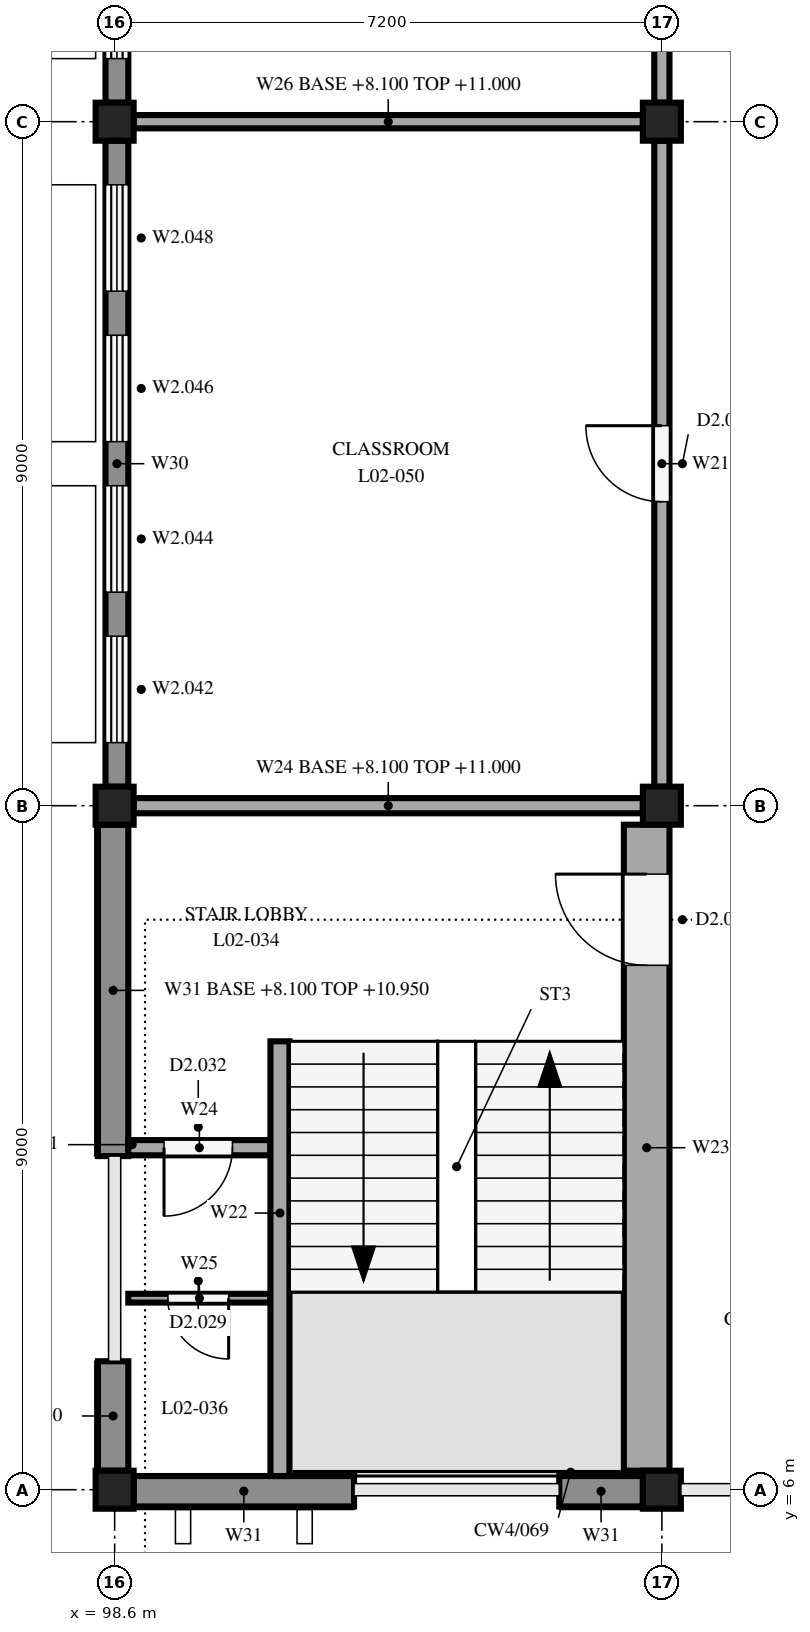
"""IFC4 building model, lengths in metres.
Left out: names, types, materials, properties, quantities, classifications, styles, units other than length and angle.
Written with IfcOpenShell. Run it as: python <this file> out.ifc"""

import sys

from ifc_helpers import new_model, si_unit, direction, frame, frame_2d, origin, origin_2d, place, context, subcontext, project, spatial, rectangle, extrude, element, fill, save


model = new_model("IFC4")
c1 = context("Model", 3, precision=1e-05, world=origin(), true_north=direction((0.0, 1.0)))
c2 = subcontext(c1, "Body", "Model", "MODEL_VIEW")
j1 = project(units=[si_unit("LENGTHUNIT", "METRE"), si_unit("PLANEANGLEUNIT", "RADIAN")], contexts=[c1])
p1 = place(None, origin())
s1 = spatial("IfcSite", under=j1, at=p1, CompositionType="ELEMENT")
p2 = place(p1, origin())
s2 = spatial("IfcBuilding", under=s1, at=p2, CompositionType="ELEMENT")
p3 = place(p2, frame((0.0, 0.0, 8.1)))
s3 = spatial("IfcBuildingStorey", under=s2, at=p3, CompositionType="ELEMENT", Elevation=8.1)
for number, where, z_axis, x_axis in (
    (1, (98.6, 6.0, 0.0), (0.0, 0.0, 1.0), (1.0, 0.0, 0.0)),
    (2, (98.6, 15.0, 0.0), (0.0, 0.0, 1.0), (1.0, 0.0, 0.0)),
    (3, (98.6, 24.0, 0.0), (0.0, 0.0, 1.0), (1.0, 0.0, 0.0)),
    (4, (105.8, 6.0, 0.0), (0.0, 0.0, 1.0), (1.0, 0.0, 0.0)),
    (5, (105.8, 15.0, 0.0), (0.0, 0.0, 1.0), (1.0, 0.0, 0.0)),
    (6, (105.8, 24.0, 0.0), (0.0, 0.0, 1.0), (1.0, 0.0, 0.0)),
):
    element("IfcColumn", number, at=place(p3, frame(where, z_axis=z_axis, x_axis=x_axis)), inside=s3, PredefinedType="COLUMN", context=c2, shape_type="SweptSolid", body=[
        extrude(rectangle(XDim=0.5, YDim=0.5, at=origin_2d()), origin(), (0.0, 0.0, 1.0), 3.35),
    ])
p4 = place(p3, frame((98.58, 6.25, 0.0), z_axis=(0.0, 0.0, 1.0), x_axis=(0.0, 1.0, 0.0)))
e7 = element("IfcWall", 7, at=p4, inside=s3, PredefinedType="STANDARD", context=c2, shape_type="SweptSolid", body=[
    extrude(rectangle(XDim=1.44, YDim=0.4, at=frame_2d((0.72, 0.0))), origin(), (0.0, 0.0, 1.0), 2.85),
])
p5 = place(p3, frame((98.58, 10.39, 0.0), z_axis=(0.0, 0.0, 1.0), x_axis=(0.0, 1.0, 0.0)))
e8 = element("IfcWall", 8, at=p5, inside=s3, PredefinedType="STANDARD", context=c2, shape_type="SweptSolid", body=[
    extrude(rectangle(XDim=4.36, YDim=0.4, at=frame_2d((2.18, 0.0))), origin(), (0.0, 0.0, 1.0), 2.85),
])
p6 = place(p3, frame((98.63, 15.25, 0.0), z_axis=(0.0, 0.0, 1.0), x_axis=(0.0, 1.0, 0.0)))
e9 = element("IfcWall", 9, at=p6, inside=s3, PredefinedType="STANDARD", context=c2, shape_type="SweptSolid", body=[
    extrude(rectangle(XDim=8.5, YDim=0.3, at=frame_2d((4.25, 0.0))), origin(), (0.0, 0.0, 1.0), 2.85),
])
p7 = place(p6, frame((0.58, 0.0, 0.6)))
e10 = element("IfcOpeningElement", 10, at=p7, cuts=e9, PredefinedType="OPENING", context=c2, shape_type="SweptSolid", body=[
    extrude(rectangle(XDim=1.4, YDim=2.2, at=frame_2d((0.7, 1.1))), frame((0.0, 0.16, 0.0), z_axis=(0.0, -1.0, 0.0), x_axis=(1.0, 0.0, 0.0)), (0.0, 0.0, 1.0), 0.32),
])
p8 = place(p6, frame((2.56, 0.0, 0.6)))
e11 = element("IfcOpeningElement", 11, at=p8, cuts=e9, PredefinedType="OPENING", context=c2, shape_type="SweptSolid", body=[
    extrude(rectangle(XDim=1.4, YDim=2.2, at=frame_2d((0.7, 1.1))), frame((0.0, 0.16, 0.0), z_axis=(0.0, -1.0, 0.0), x_axis=(1.0, 0.0, 0.0)), (0.0, 0.0, 1.0), 0.32),
])
p9 = place(p6, frame((4.54, 0.0, 0.6)))
e12 = element("IfcOpeningElement", 12, at=p9, cuts=e9, PredefinedType="OPENING", context=c2, shape_type="SweptSolid", body=[
    extrude(rectangle(XDim=1.4, YDim=2.2, at=frame_2d((0.7, 1.1))), frame((0.0, 0.16, 0.0), z_axis=(0.0, -1.0, 0.0), x_axis=(1.0, 0.0, 0.0)), (0.0, 0.0, 1.0), 0.32),
])
p10 = place(p6, frame((6.52, 0.0, 0.6)))
e13 = element("IfcOpeningElement", 13, at=p10, cuts=e9, PredefinedType="OPENING", context=c2, shape_type="SweptSolid", body=[
    extrude(rectangle(XDim=1.4, YDim=2.2, at=frame_2d((0.7, 1.1))), frame((0.0, 0.16, 0.0), z_axis=(0.0, -1.0, 0.0), x_axis=(1.0, 0.0, 0.0)), (0.0, 0.0, 1.0), 0.32),
])
p11 = place(p3, frame((98.63, 24.25, 0.0), z_axis=(0.0, 0.0, 1.0), x_axis=(0.0, 1.0, 0.0)))
e14 = element("IfcWall", 14, at=p11, inside=s3, PredefinedType="STANDARD", context=c2, shape_type="SweptSolid", body=[
    extrude(rectangle(XDim=8.5, YDim=0.3, at=frame_2d((4.25, 0.0))), origin(), (0.0, 0.0, 1.0), 2.85),
])
p12 = place(p11, frame((0.58, 0.0, 0.3)))
e15 = element("IfcOpeningElement", 15, at=p12, cuts=e14, PredefinedType="OPENING", context=c2, shape_type="SweptSolid", body=[
    extrude(rectangle(XDim=1.4, YDim=2.5, at=frame_2d((0.7, 1.25))), frame((0.0, 0.16, 0.0), z_axis=(0.0, -1.0, 0.0), x_axis=(1.0, 0.0, 0.0)), (0.0, 0.0, 1.0), 0.32),
])
p13 = place(p11, frame((2.56, 0.0, 0.3)))
e16 = element("IfcOpeningElement", 16, at=p13, cuts=e14, PredefinedType="OPENING", context=c2, shape_type="SweptSolid", body=[
    extrude(rectangle(XDim=1.4, YDim=2.5, at=frame_2d((0.7, 1.25))), frame((0.0, 0.16, 0.0), z_axis=(0.0, -1.0, 0.0), x_axis=(1.0, 0.0, 0.0)), (0.0, 0.0, 1.0), 0.32),
])
p14 = place(p11, frame((4.54, 0.0, 0.3)))
e17 = element("IfcOpeningElement", 17, at=p14, cuts=e14, PredefinedType="OPENING", context=c2, shape_type="SweptSolid", body=[
    extrude(rectangle(XDim=1.4, YDim=2.5, at=frame_2d((0.7, 1.25))), frame((0.0, 0.16, 0.0), z_axis=(0.0, -1.0, 0.0), x_axis=(1.0, 0.0, 0.0)), (0.0, 0.0, 1.0), 0.32),
])
p15 = place(p11, frame((6.52, 0.0, 0.3)))
e18 = element("IfcOpeningElement", 18, at=p15, cuts=e14, PredefinedType="OPENING", context=c2, shape_type="SweptSolid", body=[
    extrude(rectangle(XDim=1.4, YDim=2.5, at=frame_2d((0.7, 1.25))), frame((0.0, 0.16, 0.0), z_axis=(0.0, -1.0, 0.0), x_axis=(1.0, 0.0, 0.0)), (0.0, 0.0, 1.0), 0.32),
])
p16 = place(p3, frame((101.75, 5.98, 0.0), z_axis=(0.0, 0.0, 1.0), x_axis=(-1.0, 0.0, 0.0)))
e19 = element("IfcWall", 19, at=p16, inside=s3, PredefinedType="STANDARD", context=c2, shape_type="SweptSolid", body=[
    extrude(rectangle(XDim=2.9, YDim=0.4, at=frame_2d((1.45, 0.0))), origin(), (0.0, 0.0, 1.0), 2.9),
])
p17 = place(p3, frame((105.55, 5.98, 0.0), z_axis=(0.0, 0.0, 1.0), x_axis=(-1.0, 0.0, 0.0)))
e20 = element("IfcWall", 20, at=p17, inside=s3, PredefinedType="STANDARD", context=c2, shape_type="SweptSolid", body=[
    extrude(rectangle(XDim=1.1, YDim=0.4, at=frame_2d((0.55, 0.0))), origin(), (0.0, 0.0, 1.0), 2.9),
])
p18 = place(p3, frame((100.775, 6.18, 0.0), z_axis=(0.0, 0.0, 1.0), x_axis=(0.0, 1.0, 0.0)))
e21 = element("IfcWall", 21, at=p18, inside=s3, PredefinedType="SOLIDWALL", context=c2, shape_type="SweptSolid", body=[
    extrude(rectangle(XDim=5.72, YDim=0.25, at=frame_2d((2.86, 0.0))), origin(), (0.0, 0.0, 1.0), 3.35),
])
p19 = place(p3, frame((105.6, 6.25, 0.0), z_axis=(0.0, 0.0, 1.0), x_axis=(0.0, 1.0, 0.0)))
e22 = element("IfcWall", 22, at=p19, inside=s3, PredefinedType="SOLIDWALL", context=c2, shape_type="SweptSolid", body=[
    extrude(rectangle(XDim=8.5, YDim=0.6, at=frame_2d((4.25, 0.0))), origin(), (0.0, 0.0, 1.0), 3.35),
])
p20 = place(p19, frame((6.65, 0.0, 0.0)))
e23 = element("IfcOpeningElement", 23, at=p20, cuts=e22, PredefinedType="OPENING", context=c2, shape_type="SweptSolid", body=[
    extrude(rectangle(XDim=1.2, YDim=2.1, at=frame_2d((0.6, 1.05))), frame((0.0, 0.31, 0.0), z_axis=(0.0, -1.0, 0.0), x_axis=(1.0, 0.0, 0.0)), (0.0, 0.0, 1.0), 0.62),
])
p21 = place(p3, frame((100.65, 10.5, 0.0), z_axis=(0.0, 0.0, 1.0), x_axis=(-1.0, 0.0, 0.0)))
e24 = element("IfcWall", 24, at=p21, inside=s3, PredefinedType="SOLIDWALL", context=c2, shape_type="SweptSolid", body=[
    extrude(rectangle(XDim=1.87, YDim=0.2, at=frame_2d((0.935, 0.0))), origin(), (0.0, 0.0, 1.0), 3.35),
])
p22 = place(p21, frame((0.5, 0.0, 0.0)))
e25 = element("IfcOpeningElement", 25, at=p22, cuts=e24, PredefinedType="OPENING", context=c2, shape_type="SweptSolid", body=[
    extrude(rectangle(XDim=0.9, YDim=2.1, at=frame_2d((0.45, 1.05))), frame((0.0, 0.11, 0.0), z_axis=(0.0, -1.0, 0.0), x_axis=(1.0, 0.0, 0.0)), (0.0, 0.0, 1.0), 0.22),
])
p23 = place(p3, frame((100.65, 8.52, 0.0), z_axis=(0.0, 0.0, 1.0), x_axis=(-1.0, 0.0, 0.0)))
e26 = element("IfcWall", 26, at=p23, inside=s3, PredefinedType="PARTITIONING", context=c2, shape_type="SweptSolid", body=[
    extrude(rectangle(XDim=1.87, YDim=0.115, at=frame_2d((0.935, 0.0))), origin(), (0.0, 0.0, 1.0), 3.35),
])
p24 = place(p23, frame((0.55, 0.0, 0.0)))
e27 = element("IfcOpeningElement", 27, at=p24, cuts=e26, PredefinedType="OPENING", context=c2, shape_type="SweptSolid", body=[
    extrude(rectangle(XDim=0.8, YDim=2.1, at=frame_2d((0.4, 1.05))), frame((0.0, 0.067, 0.0), z_axis=(0.0, -1.0, 0.0), x_axis=(1.0, 0.0, 0.0)), (0.0, 0.0, 1.0), 0.135),
])
p25 = place(p3, frame((98.85, 15.0, 0.0), z_axis=(0.0, 0.0, 1.0), x_axis=(1.0, 0.0, 0.0)))
e28 = element("IfcWall", 28, at=p25, inside=s3, PredefinedType="SOLIDWALL", context=c2, shape_type="SweptSolid", body=[
    extrude(rectangle(XDim=6.7, YDim=0.2, at=frame_2d((3.35, 0.0))), origin(), (0.0, 0.0, 1.0), 2.9),
])
p26 = place(p3, frame((105.8, 15.25, 0.0), z_axis=(0.0, 0.0, 1.0), x_axis=(0.0, 1.0, 0.0)))
e29 = element("IfcWall", 29, at=p26, inside=s3, PredefinedType="PARTITIONING", context=c2, shape_type="SweptSolid", body=[
    extrude(rectangle(XDim=8.5, YDim=0.2, at=frame_2d((4.25, 0.0))), origin(), (0.0, 0.0, 1.0), 2.9),
])
p27 = place(p26, frame((3.75, 0.0, 0.0)))
e30 = element("IfcOpeningElement", 30, at=p27, cuts=e29, PredefinedType="OPENING", context=c2, shape_type="SweptSolid", body=[
    extrude(rectangle(XDim=1.0, YDim=2.1, at=frame_2d((0.5, 1.05))), frame((0.0, 0.11, 0.0), z_axis=(0.0, -1.0, 0.0), x_axis=(1.0, 0.0, 0.0)), (0.0, 0.0, 1.0), 0.22),
])
p28 = place(p3, frame((105.8, 24.25, 0.0), z_axis=(0.0, 0.0, 1.0), x_axis=(0.0, 1.0, 0.0)))
e31 = element("IfcWall", 31, at=p28, inside=s3, PredefinedType="PARTITIONING", context=c2, shape_type="SweptSolid", body=[
    extrude(rectangle(XDim=8.5, YDim=0.2, at=frame_2d((4.25, 0.0))), origin(), (0.0, 0.0, 1.0), 2.9),
])
p29 = place(p28, frame((3.5, 0.0, 0.0)))
e32 = element("IfcOpeningElement", 32, at=p29, cuts=e31, PredefinedType="OPENING", context=c2, shape_type="SweptSolid", body=[
    extrude(rectangle(XDim=1.5, YDim=2.1, at=frame_2d((0.75, 1.05))), frame((0.0, 0.11, 0.0), z_axis=(0.0, -1.0, 0.0), x_axis=(1.0, 0.0, 0.0)), (0.0, 0.0, 1.0), 0.22),
])
p30 = place(p3, frame((98.85, 24.0, 0.0), z_axis=(0.0, 0.0, 1.0), x_axis=(1.0, 0.0, 0.0)))
e33 = element("IfcWall", 33, at=p30, inside=s3, PredefinedType="PARTITIONING", context=c2, shape_type="SweptSolid", body=[
    extrude(rectangle(XDim=6.7, YDim=0.175, at=frame_2d((3.35, 0.0))), origin(), (0.0, 0.0, 1.0), 2.9),
])
p31 = place(p7, origin())
e34 = element("IfcWindow", 34, at=p31, inside=s3, PartitioningType="DOUBLE_PANEL_VERTICAL", PredefinedType="WINDOW", context=c2, shape_type="SweptSolid", body=[
    extrude(rectangle(XDim=1.4, YDim=2.2, at=frame_2d((0.7, 1.1))), frame((0.0, 0.03, 0.0), z_axis=(0.0, -1.0, 0.0), x_axis=(1.0, 0.0, 0.0)), (0.0, 0.0, 1.0), 0.06),
])
fill(e10, e34)
p32 = place(p8, origin())
e35 = element("IfcWindow", 35, at=p32, inside=s3, PartitioningType="DOUBLE_PANEL_VERTICAL", PredefinedType="WINDOW", context=c2, shape_type="SweptSolid", body=[
    extrude(rectangle(XDim=1.4, YDim=2.2, at=frame_2d((0.7, 1.1))), frame((0.0, 0.03, 0.0), z_axis=(0.0, -1.0, 0.0), x_axis=(1.0, 0.0, 0.0)), (0.0, 0.0, 1.0), 0.06),
])
fill(e11, e35)
p33 = place(p9, origin())
e36 = element("IfcWindow", 36, at=p33, inside=s3, PartitioningType="DOUBLE_PANEL_VERTICAL", PredefinedType="WINDOW", context=c2, shape_type="SweptSolid", body=[
    extrude(rectangle(XDim=1.4, YDim=2.2, at=frame_2d((0.7, 1.1))), frame((0.0, 0.03, 0.0), z_axis=(0.0, -1.0, 0.0), x_axis=(1.0, 0.0, 0.0)), (0.0, 0.0, 1.0), 0.06),
])
fill(e12, e36)
p34 = place(p10, origin())
e37 = element("IfcWindow", 37, at=p34, inside=s3, PartitioningType="DOUBLE_PANEL_VERTICAL", PredefinedType="WINDOW", context=c2, shape_type="SweptSolid", body=[
    extrude(rectangle(XDim=1.4, YDim=2.2, at=frame_2d((0.7, 1.1))), frame((0.0, 0.03, 0.0), z_axis=(0.0, -1.0, 0.0), x_axis=(1.0, 0.0, 0.0)), (0.0, 0.0, 1.0), 0.06),
])
fill(e13, e37)
p35 = place(p12, origin())
e38 = element("IfcWindow", 38, at=p35, inside=s3, PartitioningType="DOUBLE_PANEL_VERTICAL", PredefinedType="WINDOW", context=c2, shape_type="SweptSolid", body=[
    extrude(rectangle(XDim=1.4, YDim=2.5, at=frame_2d((0.7, 1.25))), frame((0.0, 0.03, 0.0), z_axis=(0.0, -1.0, 0.0), x_axis=(1.0, 0.0, 0.0)), (0.0, 0.0, 1.0), 0.06),
])
fill(e15, e38)
p36 = place(p20, origin())
e39 = element("IfcDoor", 39, at=p36, inside=s3, OperationType="SINGLE_SWING_RIGHT", PredefinedType="DOOR", context=c2, shape_type="SweptSolid", body=[
    extrude(rectangle(XDim=1.2, YDim=2.1, at=frame_2d((0.6, 1.05))), frame((0.0, 0.025, 0.0), z_axis=(0.0, -1.0, 0.0), x_axis=(1.0, 0.0, 0.0)), (0.0, 0.0, 1.0), 0.05),
])
fill(e23, e39)
p37 = place(p22, origin())
e40 = element("IfcDoor", 40, at=p37, inside=s3, OperationType="SINGLE_SWING_RIGHT", PredefinedType="DOOR", context=c2, shape_type="SweptSolid", body=[
    extrude(rectangle(XDim=0.9, YDim=2.1, at=frame_2d((0.45, 1.05))), frame((0.0, 0.025, 0.0), z_axis=(0.0, -1.0, 0.0), x_axis=(1.0, 0.0, 0.0)), (0.0, 0.0, 1.0), 0.05),
])
fill(e25, e40)
p38 = place(p24, origin())
e41 = element("IfcDoor", 41, at=p38, inside=s3, OperationType="SINGLE_SWING_LEFT", PredefinedType="DOOR", context=c2, shape_type="SweptSolid", body=[
    extrude(rectangle(XDim=0.8, YDim=2.1, at=frame_2d((0.4, 1.05))), frame((0.0, 0.025, 0.0), z_axis=(0.0, -1.0, 0.0), x_axis=(1.0, 0.0, 0.0)), (0.0, 0.0, 1.0), 0.05),
])
fill(e27, e41)
p39 = place(p27, origin())
e42 = element("IfcDoor", 42, at=p39, inside=s3, OperationType="SINGLE_SWING_RIGHT", PredefinedType="DOOR", context=c2, shape_type="SweptSolid", body=[
    extrude(rectangle(XDim=1.0, YDim=2.1, at=frame_2d((0.5, 1.05))), frame((0.0, 0.025, 0.0), z_axis=(0.0, -1.0, 0.0), x_axis=(1.0, 0.0, 0.0)), (0.0, 0.0, 1.0), 0.05),
])
fill(e30, e42)
save(model, sys.argv[1])
